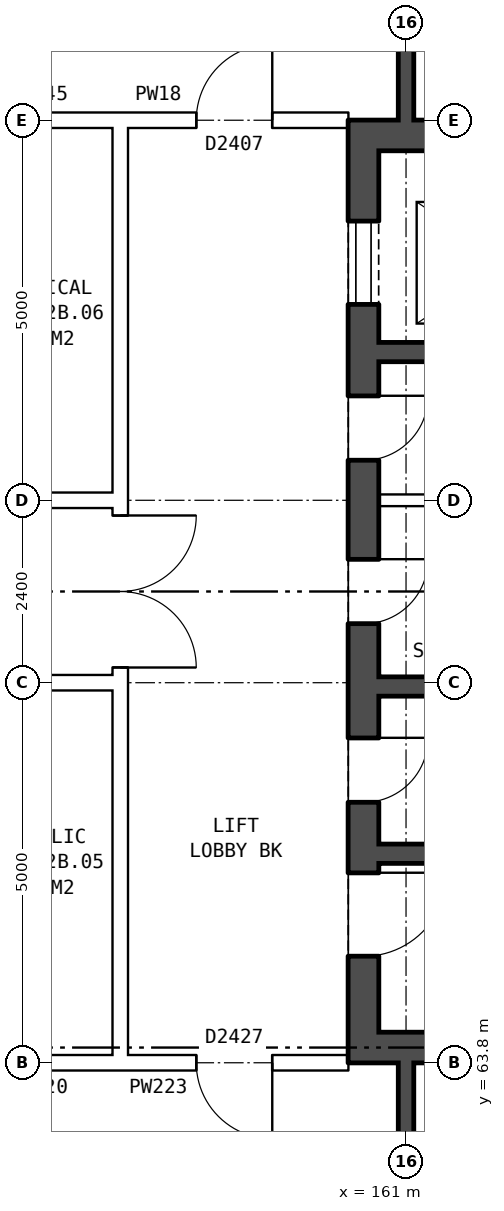
"""IFC4 building model, lengths in metres.
Left out: names, types, materials, properties, quantities, classifications, styles, units other than length and angle.
Written with IfcOpenShell. Run it as: python <this file> out.ifc"""

import sys

from ifc_helpers import new_model, si_unit, direction, frame, frame_2d, origin, place, context, subcontext, project, spatial, rectangle, extrude, element, fill, save


model = new_model("IFC4")
c1 = context("Model", 3, precision=1e-05, world=origin(), true_north=direction((0.0, 1.0)))
c2 = subcontext(c1, "Body", "Model", "MODEL_VIEW")
j1 = project(units=[si_unit("LENGTHUNIT", "METRE"), si_unit("PLANEANGLEUNIT", "RADIAN")], contexts=[c1])
p1 = place(None, origin())
s1 = spatial("IfcSite", under=j1, at=p1, CompositionType="ELEMENT")
p2 = place(p1, origin())
s2 = spatial("IfcBuilding", under=s1, at=p2, CompositionType="ELEMENT")
p3 = place(p2, frame((0.0, 0.0, 221.4)))
s3 = spatial("IfcBuildingStorey", under=s2, at=p3, CompositionType="ELEMENT", Elevation=221.4)
p4 = place(p3, frame((160.44, 76.2, 0.0), z_axis=(0.0, 0.0, 1.0), x_axis=(0.0, -1.0, 0.0)))
e1 = element("IfcWall", 1, at=p4, inside=s3, PredefinedType="SHEAR", context=c2, shape_type="SweptSolid", body=[
    extrude(rectangle(XDim=12.4, YDim=0.4, at=frame_2d((6.2, 0.0))), origin(), (0.0, 0.0, 1.0), 2.85),
])
p5 = place(p4, frame((1.325, 0.0, 0.0)))
e2 = element("IfcOpeningElement", 2, at=p5, cuts=e1, PredefinedType="OPENING", context=c2, shape_type="SweptSolid", body=[
    extrude(rectangle(XDim=1.1, YDim=2.1, at=frame_2d((0.55, 1.05))), frame((0.0, 0.21, 0.0), z_axis=(0.0, -1.0, 0.0), x_axis=(1.0, 0.0, 0.0)), (0.0, 0.0, 1.0), 0.42),
])
p6 = place(p4, frame((3.625, 0.0, 0.0)))
e3 = element("IfcOpeningElement", 3, at=p6, cuts=e1, PredefinedType="OPENING", context=c2, shape_type="SweptSolid", body=[
    extrude(rectangle(XDim=0.85, YDim=2.1, at=frame_2d((0.425, 1.05))), frame((0.0, 0.21, 0.0), z_axis=(0.0, -1.0, 0.0), x_axis=(1.0, 0.0, 0.0)), (0.0, 0.0, 1.0), 0.42),
])
p7 = place(p4, frame((5.775, 0.0, 0.0)))
e4 = element("IfcOpeningElement", 4, at=p7, cuts=e1, PredefinedType="OPENING", context=c2, shape_type="SweptSolid", body=[
    extrude(rectangle(XDim=0.85, YDim=2.1, at=frame_2d((0.425, 1.05))), frame((0.0, 0.21, 0.0), z_axis=(0.0, -1.0, 0.0), x_axis=(1.0, 0.0, 0.0)), (0.0, 0.0, 1.0), 0.42),
])
p8 = place(p4, frame((9.9, 0.0, 0.0)))
e5 = element("IfcOpeningElement", 5, at=p8, cuts=e1, PredefinedType="OPENING", context=c2, shape_type="SweptSolid", body=[
    extrude(rectangle(XDim=1.1, YDim=2.1, at=frame_2d((0.55, 1.05))), frame((0.0, 0.21, 0.0), z_axis=(0.0, -1.0, 0.0), x_axis=(1.0, 0.0, 0.0)), (0.0, 0.0, 1.0), 0.42),
])
p9 = place(p4, frame((8.125, 0.0, 0.0)))
e6 = element("IfcOpeningElement", 6, at=p9, cuts=e1, PredefinedType="OPENING", context=c2, shape_type="SweptSolid", body=[
    extrude(rectangle(XDim=0.85, YDim=2.1, at=frame_2d((0.425, 1.05))), frame((0.0, 0.21, 0.0), z_axis=(0.0, -1.0, 0.0), x_axis=(1.0, 0.0, 0.0)), (0.0, 0.0, 1.0), 0.42),
])
for number, where, z_axis, x_axis in (
    (7, (160.64, 76.0, 0.0), (0.0, 0.0, 1.0), (1.0, 0.0, 0.0)),
    (8, (160.64, 64.0, 0.0), (0.0, 0.0, 1.0), (1.0, 0.0, 0.0)),
):
    element("IfcWall", number, at=place(p3, frame(where, z_axis=z_axis, x_axis=x_axis)), inside=s3, PredefinedType="SHEAR", context=c2, shape_type="SweptSolid", body=[
        extrude(rectangle(XDim=7.6, YDim=0.4, at=frame_2d((3.8, 0.0))), origin(), (0.0, 0.0, 1.0), 2.85),
    ])
p10 = place(p3, frame((160.64, 73.15, 0.0), z_axis=(0.0, 0.0, 1.0), x_axis=(1.0, 0.0, 0.0)))
e9 = element("IfcWall", 9, at=p10, inside=s3, PredefinedType="SHEAR", context=c2, shape_type="SweptSolid", body=[
    extrude(rectangle(XDim=4.775, YDim=0.25, at=frame_2d((2.388, 0.0))), origin(), (0.0, 0.0, 1.0), 2.85),
])
p11 = place(p3, frame((160.64, 71.2, 0.0), z_axis=(0.0, 0.0, 1.0), x_axis=(1.0, 0.0, 0.0)))
e10 = element("IfcWall", 10, at=p11, inside=s3, PredefinedType="PARTITIONING", context=c2, shape_type="SweptSolid", body=[
    extrude(rectangle(XDim=2.525, YDim=0.15, at=frame_2d((1.263, 0.0))), origin(), (0.0, 0.0, 1.0), 2.85),
])
p12 = place(p3, frame((160.64, 68.75, 0.0), z_axis=(0.0, 0.0, 1.0), x_axis=(1.0, 0.0, 0.0)))
e11 = element("IfcWall", 11, at=p12, inside=s3, PredefinedType="SHEAR", context=c2, shape_type="SweptSolid", body=[
    extrude(rectangle(XDim=7.6, YDim=0.25, at=frame_2d((3.8, 0.0))), origin(), (0.0, 0.0, 1.0), 2.85),
])
p13 = place(p12, frame((5.175, 0.0, 0.0)))
e12 = element("IfcOpeningElement", 12, at=p13, cuts=e11, PredefinedType="OPENING", context=c2, shape_type="SweptSolid", body=[
    extrude(rectangle(XDim=1.1, YDim=2.1, at=frame_2d((0.55, 1.05))), frame((0.0, 0.135, 0.0), z_axis=(0.0, -1.0, 0.0), x_axis=(1.0, 0.0, 0.0)), (0.0, 0.0, 1.0), 0.27),
])
p14 = place(p12, frame((3.35, 0.0, 0.0)))
e13 = element("IfcOpeningElement", 13, at=p14, cuts=e11, PredefinedType="OPENING", context=c2, shape_type="SweptSolid", body=[
    extrude(rectangle(XDim=0.85, YDim=2.1, at=frame_2d((0.425, 1.05))), frame((0.0, 0.135, 0.0), z_axis=(0.0, -1.0, 0.0), x_axis=(1.0, 0.0, 0.0)), (0.0, 0.0, 1.0), 0.27),
])
p15 = place(p3, frame((160.64, 66.55, 0.0), z_axis=(0.0, 0.0, 1.0), x_axis=(1.0, 0.0, 0.0)))
e14 = element("IfcWall", 14, at=p15, inside=s3, PredefinedType="SHEAR", context=c2, shape_type="SweptSolid", body=[
    extrude(rectangle(XDim=2.525, YDim=0.25, at=frame_2d((1.263, 0.0))), origin(), (0.0, 0.0, 1.0), 2.85),
])
p16 = place(p3, frame((157.24, 63.9, 0.0), z_axis=(0.0, 0.0, 1.0), x_axis=(0.0, 1.0, 0.0)))
e15 = element("IfcWall", 15, at=p16, inside=s3, PredefinedType="PARTITIONING", context=c2, shape_type="SweptSolid", body=[
    extrude(rectangle(XDim=12.2, YDim=0.2, at=frame_2d((6.1, 0.0))), origin(), (0.0, 0.0, 1.0), 2.85),
])
p17 = place(p16, frame((5.1, 0.0, 0.0)))
e16 = element("IfcOpeningElement", 16, at=p17, cuts=e15, PredefinedType="OPENING", context=c2, shape_type="SweptSolid", body=[
    extrude(rectangle(XDim=2.0, YDim=2.1, at=frame_2d((1.0, 1.05))), frame((0.0, 0.11, 0.0), z_axis=(0.0, -1.0, 0.0), x_axis=(1.0, 0.0, 0.0)), (0.0, 0.0, 1.0), 0.22),
])
p18 = place(p3, frame((155.1, 63.8, 0.0), z_axis=(0.0, 0.0, 1.0), x_axis=(1.0, 0.0, 0.0)))
e17 = element("IfcWall", 17, at=p18, inside=s3, PredefinedType="PARTITIONING", context=c2, shape_type="SweptSolid", body=[
    extrude(rectangle(XDim=2.14, YDim=0.2, at=frame_2d((1.07, 0.0))), origin(), (0.0, 0.0, 1.0), 2.85),
])
p19 = place(p3, frame((157.24, 63.8, 0.0), z_axis=(0.0, 0.0, 1.0), x_axis=(1.0, 0.0, 0.0)))
e18 = element("IfcWall", 18, at=p19, inside=s3, PredefinedType="PARTITIONING", context=c2, shape_type="SweptSolid", body=[
    extrude(rectangle(XDim=3.0, YDim=0.2, at=frame_2d((1.5, 0.0))), origin(), (0.0, 0.0, 1.0), 2.85),
])
p20 = place(p19, frame((1.0, 0.0, 0.0)))
e19 = element("IfcOpeningElement", 19, at=p20, cuts=e18, PredefinedType="OPENING", context=c2, shape_type="SweptSolid", body=[
    extrude(rectangle(XDim=1.0, YDim=2.1, at=frame_2d((0.5, 1.05))), frame((0.0, 0.11, 0.0), z_axis=(0.0, -1.0, 0.0), x_axis=(1.0, 0.0, 0.0)), (0.0, 0.0, 1.0), 0.22),
])
p21 = place(p3, frame((142.76, 68.8, 0.0), z_axis=(0.0, 0.0, 1.0), x_axis=(1.0, 0.0, 0.0)))
e20 = element("IfcWall", 20, at=p21, inside=s3, PredefinedType="PARTITIONING", context=c2, shape_type="SweptSolid", body=[
    extrude(rectangle(XDim=14.48, YDim=0.2, at=frame_2d((7.24, 0.0))), origin(), (0.0, 0.0, 1.0), 2.85),
])
p22 = place(p21, frame((1.12, 0.0, 0.0)))
e21 = element("IfcOpeningElement", 21, at=p22, cuts=e20, PredefinedType="OPENING", context=c2, shape_type="SweptSolid", body=[
    extrude(rectangle(XDim=1.0, YDim=2.1, at=frame_2d((0.5, 1.05))), frame((0.0, 0.11, 0.0), z_axis=(0.0, -1.0, 0.0), x_axis=(1.0, 0.0, 0.0)), (0.0, 0.0, 1.0), 0.22),
])
p23 = place(p21, frame((10.24, 0.0, 0.0)))
e22 = element("IfcOpeningElement", 22, at=p23, cuts=e20, PredefinedType="OPENING", context=c2, shape_type="SweptSolid", body=[
    extrude(rectangle(XDim=1.0, YDim=2.1, at=frame_2d((0.5, 1.05))), frame((0.0, 0.11, 0.0), z_axis=(0.0, -1.0, 0.0), x_axis=(1.0, 0.0, 0.0)), (0.0, 0.0, 1.0), 0.22),
])
p24 = place(p3, frame((142.76, 71.2, 0.0), z_axis=(0.0, 0.0, 1.0), x_axis=(1.0, 0.0, 0.0)))
e23 = element("IfcWall", 23, at=p24, inside=s3, PredefinedType="PARTITIONING", context=c2, shape_type="SweptSolid", body=[
    extrude(rectangle(XDim=14.48, YDim=0.2, at=frame_2d((7.24, 0.0))), origin(), (0.0, 0.0, 1.0), 2.85),
])
p25 = place(p24, frame((4.24, 0.0, 0.0)))
e24 = element("IfcOpeningElement", 24, at=p25, cuts=e23, PredefinedType="OPENING", context=c2, shape_type="SweptSolid", body=[
    extrude(rectangle(XDim=1.0, YDim=2.1, at=frame_2d((0.5, 1.05))), frame((0.0, 0.11, 0.0), z_axis=(0.0, -1.0, 0.0), x_axis=(1.0, 0.0, 0.0)), (0.0, 0.0, 1.0), 0.22),
])
p26 = place(p24, frame((10.24, 0.0, 0.0)))
e25 = element("IfcOpeningElement", 25, at=p26, cuts=e23, PredefinedType="OPENING", context=c2, shape_type="SweptSolid", body=[
    extrude(rectangle(XDim=1.0, YDim=2.1, at=frame_2d((0.5, 1.05))), frame((0.0, 0.11, 0.0), z_axis=(0.0, -1.0, 0.0), x_axis=(1.0, 0.0, 0.0)), (0.0, 0.0, 1.0), 0.22),
])
p27 = place(p3, frame((155.1, 76.2, 0.0), z_axis=(0.0, 0.0, 1.0), x_axis=(1.0, 0.0, 0.0)))
e26 = element("IfcWall", 26, at=p27, inside=s3, PredefinedType="PARTITIONING", context=c2, shape_type="SweptSolid", body=[
    extrude(rectangle(XDim=2.14, YDim=0.2, at=frame_2d((1.07, 0.0))), origin(), (0.0, 0.0, 1.0), 2.85),
])
p28 = place(p3, frame((157.24, 76.2, 0.0), z_axis=(0.0, 0.0, 1.0), x_axis=(1.0, 0.0, 0.0)))
e27 = element("IfcWall", 27, at=p28, inside=s3, PredefinedType="PARTITIONING", context=c2, shape_type="SweptSolid", body=[
    extrude(rectangle(XDim=3.0, YDim=0.2, at=frame_2d((1.5, 0.0))), origin(), (0.0, 0.0, 1.0), 2.85),
])
p29 = place(p28, frame((1.0, 0.0, 0.0)))
e28 = element("IfcOpeningElement", 28, at=p29, cuts=e27, PredefinedType="OPENING", context=c2, shape_type="SweptSolid", body=[
    extrude(rectangle(XDim=1.0, YDim=2.1, at=frame_2d((0.5, 1.05))), frame((0.0, 0.11, 0.0), z_axis=(0.0, -1.0, 0.0), x_axis=(1.0, 0.0, 0.0)), (0.0, 0.0, 1.0), 0.22),
])
p30 = place(p3, frame((161.0, 54.36, 0.0), z_axis=(0.0, 0.0, 1.0), x_axis=(0.0, 1.0, 0.0)))
e29 = element("IfcWall", 29, at=p30, inside=s3, PredefinedType="SOLIDWALL", context=c2, shape_type="SweptSolid", body=[
    extrude(rectangle(XDim=9.44, YDim=0.2, at=frame_2d((4.72, 0.0))), origin(), (0.0, 0.0, 1.0), 2.85),
])
p31 = place(p30, frame((1.37, 0.0, 0.0)))
e30 = element("IfcOpeningElement", 30, at=p31, cuts=e29, PredefinedType="OPENING", context=c2, shape_type="SweptSolid", body=[
    extrude(rectangle(XDim=0.9, YDim=2.1, at=frame_2d((0.45, 1.05))), frame((0.0, 0.11, 0.0), z_axis=(0.0, -1.0, 0.0), x_axis=(1.0, 0.0, 0.0)), (0.0, 0.0, 1.0), 0.22),
])
p32 = place(p30, frame((4.14, 0.0, 0.0)))
e31 = element("IfcOpeningElement", 31, at=p32, cuts=e29, PredefinedType="OPENING", context=c2, shape_type="SweptSolid", body=[
    extrude(rectangle(XDim=0.9, YDim=2.1, at=frame_2d((0.45, 1.05))), frame((0.0, 0.11, 0.0), z_axis=(0.0, -1.0, 0.0), x_axis=(1.0, 0.0, 0.0)), (0.0, 0.0, 1.0), 0.22),
])
p33 = place(p30, frame((7.59, 0.0, 0.0)))
e32 = element("IfcOpeningElement", 32, at=p33, cuts=e29, PredefinedType="OPENING", context=c2, shape_type="SweptSolid", body=[
    extrude(rectangle(XDim=0.9, YDim=2.1, at=frame_2d((0.45, 1.05))), frame((0.0, 0.11, 0.0), z_axis=(0.0, -1.0, 0.0), x_axis=(1.0, 0.0, 0.0)), (0.0, 0.0, 1.0), 0.22),
])
p34 = place(p3, frame((161.0, 76.2, 0.0), z_axis=(0.0, 0.0, 1.0), x_axis=(0.0, 1.0, 0.0)))
e33 = element("IfcWall", 33, at=p34, inside=s3, PredefinedType="SOLIDWALL", context=c2, shape_type="SweptSolid", body=[
    extrude(rectangle(XDim=9.44, YDim=0.2, at=frame_2d((4.72, 0.0))), origin(), (0.0, 0.0, 1.0), 2.85),
])
p35 = place(p34, frame((7.17, 0.0, 0.0)))
e34 = element("IfcOpeningElement", 34, at=p35, cuts=e33, PredefinedType="OPENING", context=c2, shape_type="SweptSolid", body=[
    extrude(rectangle(XDim=0.9, YDim=2.1, at=frame_2d((0.45, 1.05))), frame((0.0, 0.11, 0.0), z_axis=(0.0, -1.0, 0.0), x_axis=(1.0, 0.0, 0.0)), (0.0, 0.0, 1.0), 0.22),
])
p36 = place(p34, frame((4.1, 0.0, 0.0)))
e35 = element("IfcOpeningElement", 35, at=p36, cuts=e33, PredefinedType="OPENING", context=c2, shape_type="SweptSolid", body=[
    extrude(rectangle(XDim=0.9, YDim=2.1, at=frame_2d((0.45, 1.05))), frame((0.0, 0.11, 0.0), z_axis=(0.0, -1.0, 0.0), x_axis=(1.0, 0.0, 0.0)), (0.0, 0.0, 1.0), 0.22),
])
p37 = place(p34, frame((0.95, 0.0, 0.0)))
e36 = element("IfcOpeningElement", 36, at=p37, cuts=e33, PredefinedType="OPENING", context=c2, shape_type="SweptSolid", body=[
    extrude(rectangle(XDim=0.9, YDim=2.1, at=frame_2d((0.45, 1.05))), frame((0.0, 0.11, 0.0), z_axis=(0.0, -1.0, 0.0), x_axis=(1.0, 0.0, 0.0)), (0.0, 0.0, 1.0), 0.22),
])
p38 = place(p5, origin())
e37 = element("IfcDoor", 37, at=p38, inside=s3, OperationType="DOUBLE_DOOR_SLIDING", PredefinedType="DOOR", context=c2, shape_type="SweptSolid", body=[
    extrude(rectangle(XDim=1.1, YDim=2.1, at=frame_2d((0.55, 1.05))), frame((0.0, 0.185, 0.0), z_axis=(0.0, -1.0, 0.0), x_axis=(1.0, 0.0, 0.0)), (0.0, 0.0, 1.0), 0.05),
])
fill(e2, e37)
p39 = place(p6, origin())
e38 = element("IfcDoor", 38, at=p39, inside=s3, OperationType="SINGLE_SWING_LEFT", PredefinedType="DOOR", context=c2, shape_type="SweptSolid", body=[
    extrude(rectangle(XDim=0.85, YDim=2.1, at=frame_2d((0.425, 1.05))), frame((0.0, 0.185, 0.0), z_axis=(0.0, -1.0, 0.0), x_axis=(1.0, 0.0, 0.0)), (0.0, 0.0, 1.0), 0.05),
])
fill(e3, e38)
p40 = place(p7, origin())
e39 = element("IfcDoor", 39, at=p40, inside=s3, OperationType="SINGLE_SWING_LEFT", PredefinedType="DOOR", context=c2, shape_type="SweptSolid", body=[
    extrude(rectangle(XDim=0.85, YDim=2.1, at=frame_2d((0.425, 1.05))), frame((0.0, 0.185, 0.0), z_axis=(0.0, -1.0, 0.0), x_axis=(1.0, 0.0, 0.0)), (0.0, 0.0, 1.0), 0.05),
])
fill(e4, e39)
p41 = place(p8, origin())
e40 = element("IfcDoor", 40, at=p41, inside=s3, OperationType="SINGLE_SWING_LEFT", PredefinedType="DOOR", context=c2, shape_type="SweptSolid", body=[
    extrude(rectangle(XDim=1.1, YDim=2.1, at=frame_2d((0.55, 1.05))), frame((0.0, 0.185, 0.0), z_axis=(0.0, -1.0, 0.0), x_axis=(1.0, 0.0, 0.0)), (0.0, 0.0, 1.0), 0.05),
])
fill(e5, e40)
p42 = place(p9, origin())
e41 = element("IfcDoor", 41, at=p42, inside=s3, OperationType="SINGLE_SWING_LEFT", PredefinedType="DOOR", context=c2, shape_type="SweptSolid", body=[
    extrude(rectangle(XDim=0.85, YDim=2.1, at=frame_2d((0.425, 1.05))), frame((0.0, 0.185, 0.0), z_axis=(0.0, -1.0, 0.0), x_axis=(1.0, 0.0, 0.0)), (0.0, 0.0, 1.0), 0.05),
])
fill(e6, e41)
p43 = place(p17, frame((2.0, 0.0, 0.0), z_axis=(0.0, 0.0, 1.0), x_axis=(-1.0, 0.0, 0.0)))
e42 = element("IfcDoor", 42, at=p43, inside=s3, OperationType="DOUBLE_DOOR_SINGLE_SWING", PredefinedType="DOOR", context=c2, shape_type="SweptSolid", body=[
    extrude(rectangle(XDim=2.0, YDim=2.1, at=frame_2d((1.0, 1.05))), frame((0.0, 0.025, 0.0), z_axis=(0.0, -1.0, 0.0), x_axis=(1.0, 0.0, 0.0)), (0.0, 0.0, 1.0), 0.05),
])
fill(e16, e42)
p44 = place(p20, frame((1.0, 0.0, 0.0), z_axis=(0.0, 0.0, 1.0), x_axis=(-1.0, 0.0, 0.0)))
e43 = element("IfcDoor", 43, at=p44, inside=s3, OperationType="SINGLE_SWING_LEFT", PredefinedType="DOOR", context=c2, shape_type="SweptSolid", body=[
    extrude(rectangle(XDim=1.0, YDim=2.1, at=frame_2d((0.5, 1.05))), frame((0.0, 0.025, 0.0), z_axis=(0.0, -1.0, 0.0), x_axis=(1.0, 0.0, 0.0)), (0.0, 0.0, 1.0), 0.05),
])
fill(e19, e43)
p45 = place(p29, origin())
e44 = element("IfcDoor", 44, at=p45, inside=s3, OperationType="SINGLE_SWING_RIGHT", PredefinedType="DOOR", context=c2, shape_type="SweptSolid", body=[
    extrude(rectangle(XDim=1.0, YDim=2.1, at=frame_2d((0.5, 1.05))), frame((0.0, 0.025, 0.0), z_axis=(0.0, -1.0, 0.0), x_axis=(1.0, 0.0, 0.0)), (0.0, 0.0, 1.0), 0.05),
])
fill(e28, e44)
save(model, sys.argv[1])
